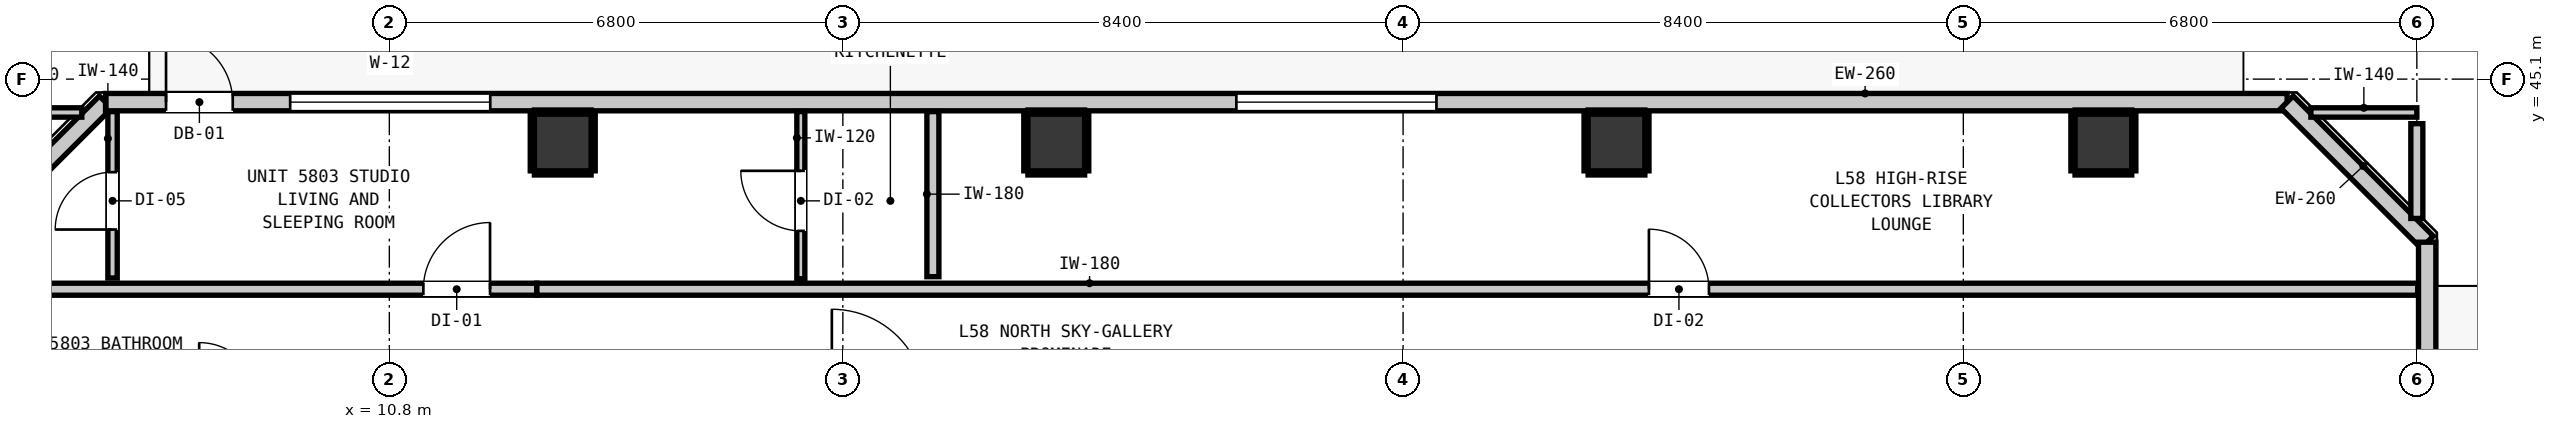
"""IFC4 building model, lengths in metres.
Left out: names, types, materials, properties, quantities, classifications, styles, units other than length and angle.
Written with IfcOpenShell. Run it as: python <this file> out.ifc"""

import sys

from ifc_helpers import new_model, si_unit, direction, frame, frame_2d, origin, origin_2d, place, context, subcontext, project, spatial, rectangle, extrude, element, fill, save


model = new_model("IFC4")
c1 = context("Model", 3, precision=1e-05, world=origin(), true_north=direction((0.0, 1.0)))
c2 = subcontext(c1, "Body", "Model", "MODEL_VIEW")
j1 = project(units=[si_unit("LENGTHUNIT", "METRE"), si_unit("PLANEANGLEUNIT", "RADIAN")], contexts=[c1])
p1 = place(None, origin())
s1 = spatial("IfcSite", under=j1, at=p1, CompositionType="ELEMENT")
p2 = place(p1, origin())
s2 = spatial("IfcBuilding", under=s1, at=p2, CompositionType="ELEMENT")
p3 = place(p2, frame((0.0, 0.0, 200.12)))
s3 = spatial("IfcBuildingStorey", under=s2, at=p3, CompositionType="ELEMENT", Elevation=200.12)
for number, where, z_axis, x_axis in (
    (1, (13.4, 44.15, 0.0), (0.0, 0.0, 1.0), (1.0, 0.0, 0.0)),
    (2, (20.8, 44.15, 0.0), (0.0, 0.0, 1.0), (1.0, 0.0, 0.0)),
    (3, (29.2, 44.15, 0.0), (0.0, 0.0, 1.0), (1.0, 0.0, 0.0)),
    (4, (36.5, 44.15, 0.0), (0.0, 0.0, 1.0), (1.0, 0.0, 0.0)),
):
    element("IfcColumn", number, at=place(p3, frame(where, z_axis=z_axis, x_axis=x_axis)), inside=s3, PredefinedType="COLUMN", context=c2, shape_type="SweptSolid", body=[
        extrude(rectangle(XDim=0.85, YDim=0.85, at=origin_2d()), origin(), (0.0, 0.0, 1.0), 3.32),
    ])
p4 = place(p3, frame((4.445, 42.655, 0.0), z_axis=(0.0, 0.0, 1.0), x_axis=(0.707106781187, 0.707106781187, 0.0)))
e5 = element("IfcWall", 5, at=p4, inside=s3, PredefinedType="STANDARD", context=c2, shape_type="SweptSolid", body=[
    extrude(rectangle(XDim=2.97, YDim=0.26, at=frame_2d((1.485, 0.0))), origin(), (0.0, 0.0, 1.0), 3.1),
])
p5 = place(p3, frame((6.545, 44.755, 0.0), z_axis=(0.0, 0.0, 1.0), x_axis=(1.0, 0.0, 0.0)))
e6 = element("IfcWall", 6, at=p5, inside=s3, PredefinedType="STANDARD", context=c2, shape_type="SweptSolid", body=[
    extrude(rectangle(XDim=32.71, YDim=0.26, at=frame_2d((16.355, 0.0))), origin(), (0.0, 0.0, 1.0), 3.1),
])
p6 = place(p5, frame((0.907, 0.0, 0.0)))
e7 = element("IfcOpeningElement", 7, at=p6, cuts=e6, PredefinedType="OPENING", context=c2, shape_type="SweptSolid", body=[
    extrude(rectangle(XDim=1.0, YDim=2.15, at=frame_2d((0.5, 1.075))), frame((0.0, 0.14, 0.0), z_axis=(0.0, -1.0, 0.0), x_axis=(1.0, 0.0, 0.0)), (0.0, 0.0, 1.0), 0.28),
])
p7 = place(p5, frame((2.768, 0.0, 0.85)))
e8 = element("IfcOpeningElement", 8, at=p7, cuts=e6, PredefinedType="OPENING", context=c2, shape_type="SweptSolid", body=[
    extrude(rectangle(XDim=3.0, YDim=2.1, at=frame_2d((1.5, 1.05))), frame((0.0, 0.14, 0.0), z_axis=(0.0, -1.0, 0.0), x_axis=(1.0, 0.0, 0.0)), (0.0, 0.0, 1.0), 0.28),
])
p8 = place(p5, frame((16.955, 0.0, 0.85)))
e9 = element("IfcOpeningElement", 9, at=p8, cuts=e6, PredefinedType="OPENING", context=c2, shape_type="SweptSolid", body=[
    extrude(rectangle(XDim=3.0, YDim=2.1, at=frame_2d((1.5, 1.05))), frame((0.0, 0.14, 0.0), z_axis=(0.0, -1.0, 0.0), x_axis=(1.0, 0.0, 0.0)), (0.0, 0.0, 1.0), 0.28),
])
p9 = place(p3, frame((39.255, 44.755, 0.0), z_axis=(0.0, 0.0, 1.0), x_axis=(0.707147883682, -0.707065676302, 0.0)))
e10 = element("IfcWall", 10, at=p9, inside=s3, PredefinedType="STANDARD", context=c2, shape_type="SweptSolid", body=[
    extrude(rectangle(XDim=2.97, YDim=0.26, at=frame_2d((1.485, 0.0))), origin(), (0.0, 0.0, 1.0), 3.1),
])
p10 = place(p3, frame((41.355, 42.655, 0.0), z_axis=(0.0, 0.0, 1.0), x_axis=(0.0, -1.0, 0.0)))
e11 = element("IfcWall", 11, at=p10, inside=s3, PredefinedType="STANDARD", context=c2, shape_type="SweptSolid", body=[
    extrude(rectangle(XDim=30.31, YDim=0.26, at=frame_2d((15.155, 0.0))), origin(), (0.0, 0.0, 1.0), 3.1),
])
p11 = place(p10, frame((23.818, 0.0, 0.0)))
e12 = element("IfcOpeningElement", 12, at=p11, cuts=e11, PredefinedType="OPENING", context=c2, shape_type="SweptSolid", body=[
    extrude(rectangle(XDim=1.0, YDim=2.15, at=frame_2d((0.5, 1.075))), frame((0.0, 0.14, 0.0), z_axis=(0.0, -1.0, 0.0), x_axis=(1.0, 0.0, 0.0)), (0.0, 0.0, 1.0), 0.28),
])
p12 = place(p10, frame((25.482, 0.0, 0.85)))
e13 = element("IfcOpeningElement", 13, at=p12, cuts=e11, PredefinedType="OPENING", context=c2, shape_type="SweptSolid", body=[
    extrude(rectangle(XDim=1.05, YDim=1.65, at=frame_2d((0.525, 0.825))), frame((0.0, 0.14, 0.0), z_axis=(0.0, -1.0, 0.0), x_axis=(1.0, 0.0, 0.0)), (0.0, 0.0, 1.0), 0.28),
])
p13 = place(p10, frame((28.183, 0.0, 0.85)))
e14 = element("IfcOpeningElement", 14, at=p13, cuts=e11, PredefinedType="OPENING", context=c2, shape_type="SweptSolid", body=[
    extrude(rectangle(XDim=1.05, YDim=1.65, at=frame_2d((0.525, 0.825))), frame((0.0, 0.14, 0.0), z_axis=(0.0, -1.0, 0.0), x_axis=(1.0, 0.0, 0.0)), (0.0, 0.0, 1.0), 0.28),
])
p14 = place(p3, frame((5.388, 41.95, 0.0), z_axis=(0.0, 0.0, 1.0), x_axis=(1.0, 0.0, 0.0)))
e15 = element("IfcWall", 15, at=p14, inside=s3, PredefinedType="PARTITIONING", context=c2, shape_type="SweptSolid", body=[
    extrude(rectangle(XDim=7.624, YDim=0.18, at=frame_2d((3.812, 0.0))), origin(), (0.0, 0.0, 1.0), 2.477),
])
p15 = place(p14, frame((5.922, 0.0, 0.0)))
e16 = element("IfcOpeningElement", 16, at=p15, cuts=e15, PredefinedType="OPENING", context=c2, shape_type="SweptSolid", body=[
    extrude(rectangle(XDim=1.0, YDim=2.15, at=frame_2d((0.5, 1.075))), frame((0.0, 0.1, 0.0), z_axis=(0.0, -1.0, 0.0), x_axis=(1.0, 0.0, 0.0)), (0.0, 0.0, 1.0), 0.2),
])
p16 = place(p3, frame((13.012, 41.95, 0.0), z_axis=(0.0, 0.0, 1.0), x_axis=(1.0, 0.0, 0.0)))
e17 = element("IfcWall", 17, at=p16, inside=s3, PredefinedType="PARTITIONING", context=c2, shape_type="SweptSolid", body=[
    extrude(rectangle(XDim=28.201, YDim=0.18, at=frame_2d((14.101, 0.0))), origin(), (0.0, 0.0, 1.0), 3.1),
])
p17 = place(p16, frame((16.674, 0.0, 0.0)))
e18 = element("IfcOpeningElement", 18, at=p17, cuts=e17, PredefinedType="OPENING", context=c2, shape_type="SweptSolid", body=[
    extrude(rectangle(XDim=0.9, YDim=2.1, at=frame_2d((0.45, 1.05))), frame((0.0, 0.1, 0.0), z_axis=(0.0, -1.0, 0.0), x_axis=(1.0, 0.0, 0.0)), (0.0, 0.0, 1.0), 0.2),
])
for number, where, z_axis, x_axis in (
    (19, (4.6, 44.6, 0.0), (0.0, 0.0, 1.0), (1.0, 0.0, 0.0)),
    (20, (39.611, 44.6, 0.0), (0.0, 0.0, 1.0), (1.0, 0.0, 0.0)),
):
    element("IfcWall", number, at=place(p3, frame(where, z_axis=z_axis, x_axis=x_axis)), inside=s3, PredefinedType="PARTITIONING", context=c2, shape_type="SweptSolid", body=[
        extrude(rectangle(XDim=1.589, YDim=0.14, at=frame_2d((0.794, 0.0))), origin(), (0.0, 0.0, 1.0), 3.1),
    ])
p18 = place(p3, frame((18.95, 42.138, 0.0), z_axis=(0.0, 0.0, 1.0), x_axis=(0.0, 1.0, 0.0)))
e21 = element("IfcWall", 21, at=p18, inside=s3, PredefinedType="PARTITIONING", context=c2, shape_type="SweptSolid", body=[
    extrude(rectangle(XDim=2.475, YDim=0.18, at=frame_2d((1.238, 0.0))), origin(), (0.0, 0.0, 1.0), 3.1),
])
p19 = place(p3, frame((41.2, 43.011, 0.0), z_axis=(0.0, 0.0, 1.0), x_axis=(0.0, 1.0, 0.0)))
e22 = element("IfcWall", 22, at=p19, inside=s3, PredefinedType="PARTITIONING", context=c2, shape_type="SweptSolid", body=[
    extrude(rectangle(XDim=1.421, YDim=0.18, at=frame_2d((0.71, 0.0))), origin(), (0.0, 0.0, 1.0), 3.1),
])
p20 = place(p3, frame((6.65, 42.118, 0.0), z_axis=(0.0, 0.0, 1.0), x_axis=(0.0, 1.0, 0.0)))
e23 = element("IfcWall", 23, at=p20, inside=s3, PredefinedType="PARTITIONING", context=c2, shape_type="SweptSolid", body=[
    extrude(rectangle(XDim=2.495, YDim=0.14, at=frame_2d((1.248, 0.0))), origin(), (0.0, 0.0, 1.0), 3.1),
])
p21 = place(p20, frame((0.727, 0.0, 0.0)))
e24 = element("IfcOpeningElement", 24, at=p21, cuts=e23, PredefinedType="OPENING", context=c2, shape_type="SweptSolid", body=[
    extrude(rectangle(XDim=0.86, YDim=2.02, at=frame_2d((0.43, 1.01))), frame((0.0, 0.08, 0.0), z_axis=(0.0, -1.0, 0.0), x_axis=(1.0, 0.0, 0.0)), (0.0, 0.0, 1.0), 0.16),
])
p22 = place(p3, frame((16.97, 42.108, 0.0), z_axis=(0.0, 0.0, 1.0), x_axis=(0.0, 1.0, 0.0)))
e25 = element("IfcWall", 25, at=p22, inside=s3, PredefinedType="PARTITIONING", context=c2, shape_type="SweptSolid", body=[
    extrude(rectangle(XDim=2.505, YDim=0.12, at=frame_2d((1.252, 0.0))), origin(), (0.0, 0.0, 1.0), 3.1),
])
p23 = place(p22, frame((0.717, 0.0, 0.0)))
e26 = element("IfcOpeningElement", 26, at=p23, cuts=e25, PredefinedType="OPENING", context=c2, shape_type="SweptSolid", body=[
    extrude(rectangle(XDim=0.9, YDim=2.1, at=frame_2d((0.45, 1.05))), frame((0.0, 0.07, 0.0), z_axis=(0.0, -1.0, 0.0), x_axis=(1.0, 0.0, 0.0)), (0.0, 0.0, 1.0), 0.14),
])
for number, where, z_axis, x_axis in (
    (27, (12.975, 43.693, 0.0), (0.0, 0.0, 1.0), (1.0, 0.0, 0.0)),
    (28, (12.975, 44.607, 0.0), (0.0, 0.0, 1.0), (1.0, 0.0, 0.0)),
    (29, (12.943, 43.725, 0.0), (0.0, 0.0, 1.0), (0.0, 1.0, 0.0)),
    (30, (13.857, 43.725, 0.0), (0.0, 0.0, 1.0), (0.0, 1.0, 0.0)),
):
    element("IfcWall", number, at=place(p3, frame(where, z_axis=z_axis, x_axis=x_axis)), inside=s3, PredefinedType="PARTITIONING", context=c2, shape_type="SweptSolid", body=[
        extrude(rectangle(XDim=0.85, YDim=0.06, at=frame_2d((0.425, 0.0))), origin(), (0.0, 0.0, 1.0), 1.45),
    ])
for number, where, z_axis, x_axis in (
    (31, (20.375, 43.693, 0.0), (0.0, 0.0, 1.0), (1.0, 0.0, 0.0)),
    (32, (20.375, 44.607, 0.0), (0.0, 0.0, 1.0), (1.0, 0.0, 0.0)),
):
    element("IfcWall", number, at=place(p3, frame(where, z_axis=z_axis, x_axis=x_axis)), inside=s3, PredefinedType="PARTITIONING", context=c2, shape_type="SweptSolid", body=[
        extrude(rectangle(XDim=0.85, YDim=0.06, at=frame_2d((0.425, 0.0))), origin(), (0.0, 0.0, 1.0), 1.45),
    ])
for number, where, z_axis, x_axis in (
    (33, (20.343, 43.725, 0.0), (0.0, 0.0, 1.0), (0.0, 1.0, 0.0)),
    (34, (21.257, 43.725, 0.0), (0.0, 0.0, 1.0), (0.0, 1.0, 0.0)),
):
    element("IfcWall", number, at=place(p3, frame(where, z_axis=z_axis, x_axis=x_axis)), inside=s3, PredefinedType="PARTITIONING", context=c2, shape_type="SweptSolid", body=[
        extrude(rectangle(XDim=0.85, YDim=0.06, at=frame_2d((0.425, 0.0))), origin(), (0.0, 0.0, 1.0), 1.45),
    ])
for number, where, z_axis, x_axis in (
    (35, (28.775, 43.693, 0.0), (0.0, 0.0, 1.0), (1.0, 0.0, 0.0)),
    (36, (28.775, 44.607, 0.0), (0.0, 0.0, 1.0), (1.0, 0.0, 0.0)),
):
    element("IfcWall", number, at=place(p3, frame(where, z_axis=z_axis, x_axis=x_axis)), inside=s3, PredefinedType="PARTITIONING", context=c2, shape_type="SweptSolid", body=[
        extrude(rectangle(XDim=0.85, YDim=0.06, at=frame_2d((0.425, 0.0))), origin(), (0.0, 0.0, 1.0), 1.45),
    ])
for number, where, z_axis, x_axis in (
    (37, (28.743, 43.725, 0.0), (0.0, 0.0, 1.0), (0.0, 1.0, 0.0)),
    (38, (29.657, 43.725, 0.0), (0.0, 0.0, 1.0), (0.0, 1.0, 0.0)),
):
    element("IfcWall", number, at=place(p3, frame(where, z_axis=z_axis, x_axis=x_axis)), inside=s3, PredefinedType="PARTITIONING", context=c2, shape_type="SweptSolid", body=[
        extrude(rectangle(XDim=0.85, YDim=0.06, at=frame_2d((0.425, 0.0))), origin(), (0.0, 0.0, 1.0), 1.45),
    ])
for number, where, z_axis, x_axis in (
    (39, (36.075, 43.693, 0.0), (0.0, 0.0, 1.0), (1.0, 0.0, 0.0)),
    (40, (36.075, 44.607, 0.0), (0.0, 0.0, 1.0), (1.0, 0.0, 0.0)),
):
    element("IfcWall", number, at=place(p3, frame(where, z_axis=z_axis, x_axis=x_axis)), inside=s3, PredefinedType="PARTITIONING", context=c2, shape_type="SweptSolid", body=[
        extrude(rectangle(XDim=0.85, YDim=0.06, at=frame_2d((0.425, 0.0))), origin(), (0.0, 0.0, 1.0), 1.45),
    ])
for number, where, z_axis, x_axis in (
    (41, (36.043, 43.725, 0.0), (0.0, 0.0, 1.0), (0.0, 1.0, 0.0)),
    (42, (36.957, 43.725, 0.0), (0.0, 0.0, 1.0), (0.0, 1.0, 0.0)),
):
    element("IfcWall", number, at=place(p3, frame(where, z_axis=z_axis, x_axis=x_axis)), inside=s3, PredefinedType="PARTITIONING", context=c2, shape_type="SweptSolid", body=[
        extrude(rectangle(XDim=0.85, YDim=0.06, at=frame_2d((0.425, 0.0))), origin(), (0.0, 0.0, 1.0), 1.45),
    ])
p24 = place(p6, origin())
e43 = element("IfcDoor", 43, at=p24, inside=s3, OperationType="SINGLE_SWING_LEFT", PredefinedType="DOOR", context=c2, shape_type="SweptSolid", body=[
    extrude(rectangle(XDim=1.0, YDim=2.15, at=frame_2d((0.5, 1.075))), frame((0.0, 0.025, 0.0), z_axis=(0.0, -1.0, 0.0), x_axis=(1.0, 0.0, 0.0)), (0.0, 0.0, 1.0), 0.05),
])
fill(e7, e43)
p25 = place(p7, origin())
e44 = element("IfcWindow", 44, at=p25, inside=s3, PartitioningType="SINGLE_PANEL", PredefinedType="WINDOW", context=c2, shape_type="SweptSolid", body=[
    extrude(rectangle(XDim=3.0, YDim=2.1, at=frame_2d((1.5, 1.05))), frame((0.0, 0.03, 0.0), z_axis=(0.0, -1.0, 0.0), x_axis=(1.0, 0.0, 0.0)), (0.0, 0.0, 1.0), 0.06),
])
fill(e8, e44)
p26 = place(p8, origin())
e45 = element("IfcWindow", 45, at=p26, inside=s3, PartitioningType="SINGLE_PANEL", PredefinedType="WINDOW", context=c2, shape_type="SweptSolid", body=[
    extrude(rectangle(XDim=3.0, YDim=2.1, at=frame_2d((1.5, 1.05))), frame((0.0, 0.03, 0.0), z_axis=(0.0, -1.0, 0.0), x_axis=(1.0, 0.0, 0.0)), (0.0, 0.0, 1.0), 0.06),
])
fill(e9, e45)
p27 = place(p15, origin())
e46 = element("IfcDoor", 46, at=p27, inside=s3, OperationType="SINGLE_SWING_RIGHT", PredefinedType="DOOR", context=c2, shape_type="SweptSolid", body=[
    extrude(rectangle(XDim=1.0, YDim=2.15, at=frame_2d((0.5, 1.075))), frame((0.0, 0.025, 0.0), z_axis=(0.0, -1.0, 0.0), x_axis=(1.0, 0.0, 0.0)), (0.0, 0.0, 1.0), 0.05),
])
fill(e16, e46)
p28 = place(p21, origin())
e47 = element("IfcDoor", 47, at=p28, inside=s3, OperationType="SINGLE_SWING_LEFT", PredefinedType="DOOR", context=c2, shape_type="SweptSolid", body=[
    extrude(rectangle(XDim=0.86, YDim=2.02, at=frame_2d((0.43, 1.01))), frame((0.0, 0.025, 0.0), z_axis=(0.0, -1.0, 0.0), x_axis=(1.0, 0.0, 0.0)), (0.0, 0.0, 1.0), 0.05),
])
fill(e24, e47)
p29 = place(p23, origin())
e48 = element("IfcDoor", 48, at=p29, inside=s3, OperationType="SINGLE_SWING_RIGHT", PredefinedType="DOOR", context=c2, shape_type="SweptSolid", body=[
    extrude(rectangle(XDim=0.9, YDim=2.1, at=frame_2d((0.45, 1.05))), frame((0.0, 0.025, 0.0), z_axis=(0.0, -1.0, 0.0), x_axis=(1.0, 0.0, 0.0)), (0.0, 0.0, 1.0), 0.05),
])
fill(e26, e48)
p30 = place(p17, origin())
e49 = element("IfcDoor", 49, at=p30, inside=s3, OperationType="SINGLE_SWING_LEFT", PredefinedType="DOOR", context=c2, shape_type="SweptSolid", body=[
    extrude(rectangle(XDim=0.9, YDim=2.1, at=frame_2d((0.45, 1.05))), frame((0.0, 0.025, 0.0), z_axis=(0.0, -1.0, 0.0), x_axis=(1.0, 0.0, 0.0)), (0.0, 0.0, 1.0), 0.05),
])
fill(e18, e49)
save(model, sys.argv[1])
